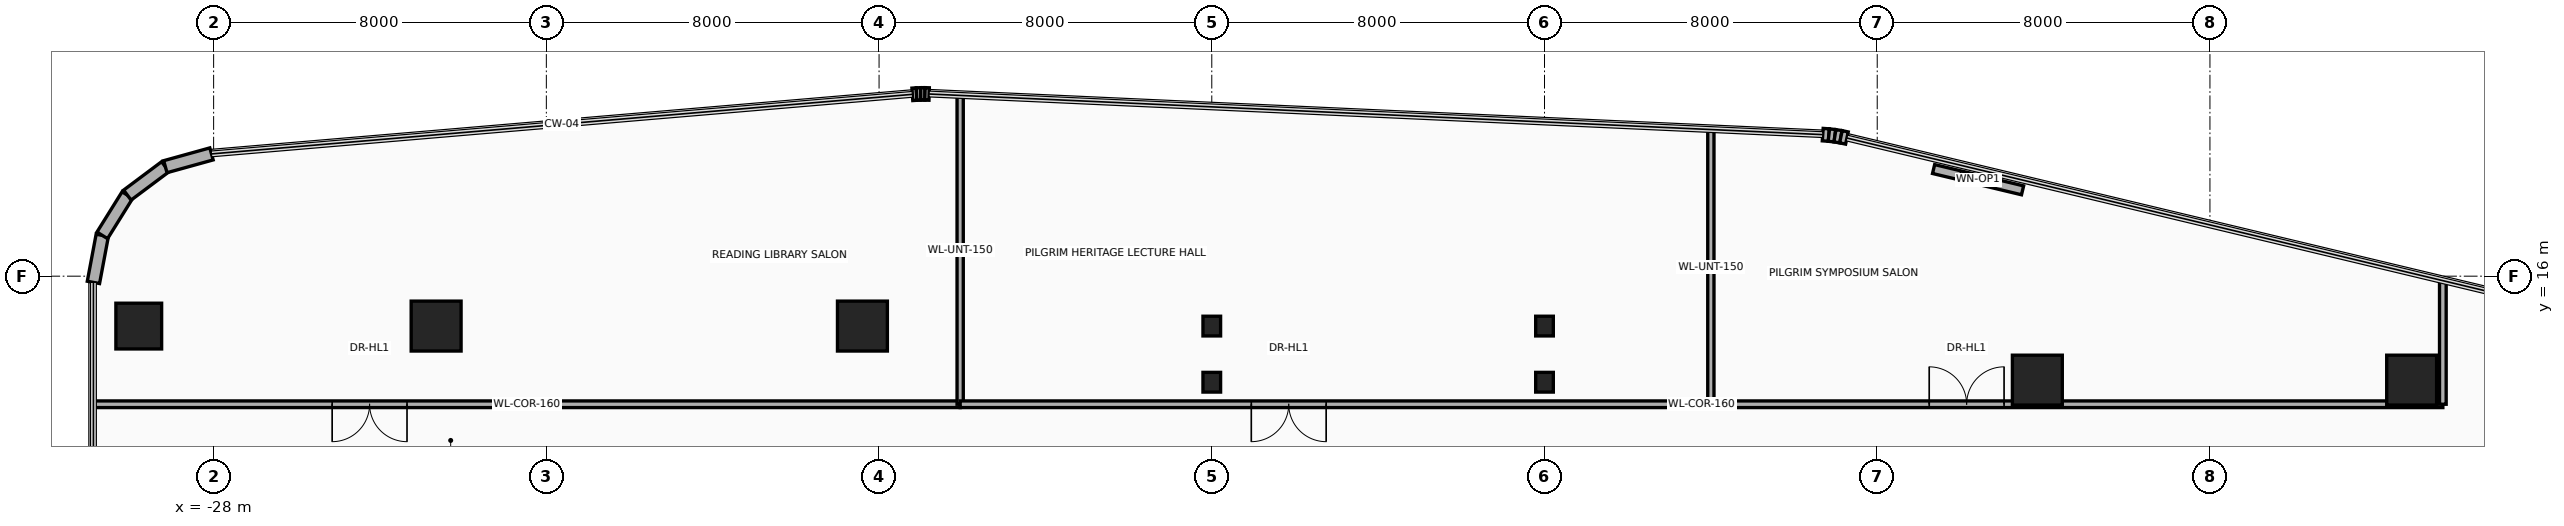
"""IFC4 building model, lengths in metres.
Left out: names, types, materials, properties, quantities, classifications, styles, units other than length and angle.
Written with IfcOpenShell. Run it as: python <this file> out.ifc"""

import sys

from ifc_helpers import new_model, si_unit, direction, frame, frame_2d, origin, origin_2d, place, context, subcontext, project, spatial, rectangle, circle, i_section, extrude, source, transform, mapped, element, fill, save


model = new_model("IFC4")
c1 = context("Model", 3, precision=1e-05, world=origin(), true_north=direction((0.0, 1.0)))
c2 = subcontext(c1, "Body", "Model", "MODEL_VIEW")
j1 = project(units=[si_unit("LENGTHUNIT", "METRE"), si_unit("PLANEANGLEUNIT", "RADIAN")], contexts=[c1])
p1 = place(None, origin())
s1 = spatial("IfcSite", under=j1, at=p1, CompositionType="ELEMENT")
p2 = place(p1, origin())
s2 = spatial("IfcBuilding", under=s1, at=p2, CompositionType="ELEMENT")
p3 = place(p2, frame((0.0, 0.0, 101.1)))
s3 = spatial("IfcBuildingStorey", under=s2, at=p3, CompositionType="ELEMENT", Elevation=101.1)
m1 = source(origin(), c2, "Body", "SweptSolid", [
    extrude(circle(Radius=0.55, at=origin_2d()), origin(), (0.0, 0.0, 1.0), 4.6),
])
p4 = place(p3, frame((-29.8, 14.8, 0.0), z_axis=(0.0, 0.0, 1.0), x_axis=(1.0, 0.0, 0.0)))
e1 = element("IfcColumn", 1, at=p4, inside=s3, PredefinedType="COLUMN", context=c2, shape_type="MappedRepresentation", body=[
    mapped(m1, transform((0.0, 0.0, 0.0), x_axis=(1.0, 0.0, 0.0), y_axis=(0.0, 1.0, 0.0), z_axis=(0.0, 0.0, 1.0), scale=1.0)),
])
m2 = source(origin(), c2, "Body", "SweptSolid", [
    extrude(rectangle(XDim=1.2, YDim=1.2, at=origin_2d()), origin(), (0.0, 0.0, 1.0), 4.6),
])
for number, where, z_axis, x_axis in (
    (2, (-22.65, 14.8, 0.0), (0.0, 0.0, 1.0), (1.0, 0.0, 0.0)),
    (3, (-12.4, 14.8, 0.0), (0.0, 0.0, 1.0), (1.0, 0.0, 0.0)),
    (4, (15.85, 13.5, 0.0), (0.0, 0.0, 1.0), (1.0, 0.0, 0.0)),
    (5, (24.85, 13.5, 0.0), (0.0, 0.0, 1.0), (1.0, 0.0, 0.0)),
):
    element("IfcColumn", number, at=place(p3, frame(where, z_axis=z_axis, x_axis=x_axis)), inside=s3, PredefinedType="COLUMN", context=c2, shape_type="MappedRepresentation", body=[
        mapped(m2, transform((0.0, 0.0, 0.0), x_axis=(1.0, 0.0, 0.0), y_axis=(0.0, 1.0, 0.0), z_axis=(0.0, 0.0, 1.0), scale=1.0)),
    ])
m3 = source(origin(), c2, "Body", "SweptSolid", [
    extrude(i_section(OverallWidth=0.424, OverallDepth=0.474, WebThickness=0.048, FlangeThickness=0.077, at=origin_2d()), origin(), (0.0, 0.0, 1.0), 4.6),
])
for number, where, z_axis, x_axis in (
    (6, (-4.0, 13.45, 0.0), (0.0, 0.0, 1.0), (1.0, 0.0, 0.0)),
    (7, (-4.0, 14.8, 0.0), (0.0, 0.0, 1.0), (1.0, 0.0, 0.0)),
    (8, (4.0, 13.45, 0.0), (0.0, 0.0, 1.0), (1.0, 0.0, 0.0)),
    (9, (4.0, 14.8, 0.0), (0.0, 0.0, 1.0), (1.0, 0.0, 0.0)),
):
    element("IfcColumn", number, at=place(p3, frame(where, z_axis=z_axis, x_axis=x_axis)), inside=s3, PredefinedType="COLUMN", context=c2, shape_type="MappedRepresentation", body=[
        mapped(m3, transform((0.0, 0.0, 0.0), x_axis=(1.0, 0.0, 0.0), y_axis=(0.0, 1.0, 0.0), z_axis=(0.0, 0.0, 1.0), scale=1.0)),
    ])
p5 = place(p3, frame((-30.89, 15.85, 0.0), z_axis=(0.0, 0.0, 1.0), x_axis=(0.184557499391, 0.982821718023, 0.0)))
e10 = element("IfcWall", 10, at=p5, inside=s3, PredefinedType="SOLIDWALL", context=c2, shape_type="SweptSolid", body=[
    extrude(rectangle(XDim=1.151, YDim=0.3, at=frame_2d((0.575, 0.0))), origin(), (0.0, 0.0, 1.0), 4.36),
])
p6 = place(p3, frame((-30.677, 16.981, 0.0), z_axis=(0.0, 0.0, 1.0), x_axis=(0.52880576008, 0.848742875143, 0.0)))
e11 = element("IfcWall", 11, at=p6, inside=s3, PredefinedType="SOLIDWALL", context=c2, shape_type="SweptSolid", body=[
    extrude(rectangle(XDim=1.141, YDim=0.3, at=frame_2d((0.57, 0.0))), origin(), (0.0, 0.0, 1.0), 4.36),
])
p7 = place(p3, frame((-30.074, 17.95, 0.0), z_axis=(0.0, 0.0, 1.0), x_axis=(0.800975009324, 0.598697782223, 0.0)))
e12 = element("IfcWall", 12, at=p7, inside=s3, PredefinedType="SOLIDWALL", context=c2, shape_type="SweptSolid", body=[
    extrude(rectangle(XDim=1.141, YDim=0.3, at=frame_2d((0.57, 0.0))), origin(), (0.0, 0.0, 1.0), 4.36),
])
p8 = place(p3, frame((-29.161, 18.633, 0.0), z_axis=(0.0, 0.0, 1.0), x_axis=(0.963624193367, 0.267260947313, 0.0)))
e13 = element("IfcWall", 13, at=p8, inside=s3, PredefinedType="SOLIDWALL", context=c2, shape_type="SweptSolid", body=[
    extrude(rectangle(XDim=1.151, YDim=0.3, at=frame_2d((0.575, 0.0))), origin(), (0.0, 0.0, 1.0), 4.36),
])
p9 = place(p3, frame((-11.199, 20.373, 0.0), z_axis=(0.0, 0.0, 1.0), x_axis=(0.997567332166, 0.069709524416, 0.0)))
e14 = element("IfcWall", 14, at=p9, inside=s3, PredefinedType="SOLIDWALL", context=c2, shape_type="SweptSolid", body=[
    extrude(rectangle(XDim=0.102, YDim=0.3, at=frame_2d((0.051, 0.0))), origin(), (0.0, 0.0, 1.0), 4.36),
])
p10 = place(p3, frame((-11.098, 20.38, 0.0), z_axis=(0.0, 0.0, 1.0), x_axis=(0.999334672785, 0.03647206835, 0.0)))
e15 = element("IfcWall", 15, at=p10, inside=s3, PredefinedType="SOLIDWALL", context=c2, shape_type="SweptSolid", body=[
    extrude(rectangle(XDim=0.1, YDim=0.3, at=frame_2d((0.05, 0.0))), origin(), (0.0, 0.0, 1.0), 4.36),
])
p11 = place(p3, frame((-10.998, 20.383, 0.0), z_axis=(0.0, 0.0, 1.0), x_axis=(0.999997054401, 0.002427177317, 0.0)))
e16 = element("IfcWall", 16, at=p11, inside=s3, PredefinedType="SOLIDWALL", context=c2, shape_type="SweptSolid", body=[
    extrude(rectangle(XDim=0.101, YDim=0.3, at=frame_2d((0.05, 0.0))), origin(), (0.0, 0.0, 1.0), 4.36),
])
p12 = place(p3, frame((-10.897, 20.384, 0.0), z_axis=(0.0, 0.0, 1.0), x_axis=(0.999584209171, -0.02883415988, 0.0)))
e17 = element("IfcWall", 17, at=p12, inside=s3, PredefinedType="SOLIDWALL", context=c2, shape_type="SweptSolid", body=[
    extrude(rectangle(XDim=0.102, YDim=0.3, at=frame_2d((0.051, 0.0))), origin(), (0.0, 0.0, 1.0), 4.36),
])
p13 = place(p3, frame((10.69, 19.404, 0.0), z_axis=(0.0, 0.0, 1.0), x_axis=(0.99758310784, -0.069483400546, 0.0)))
e18 = element("IfcWall", 18, at=p13, inside=s3, PredefinedType="SOLIDWALL", context=c2, shape_type="SweptSolid", body=[
    extrude(rectangle(XDim=0.147, YDim=0.3, at=frame_2d((0.074, 0.0))), origin(), (0.0, 0.0, 1.0), 4.36),
])
for number, where, z_axis, x_axis in (
    (19, (10.837, 19.394, 0.0), (0.0, 0.0, 1.0), (0.993, -0.117, 0.0)),
    (20, (10.983, 19.377, 0.0), (0.0, 0.0, 1.0), (0.987, -0.163, 0.0)),
):
    element("IfcWall", number, at=place(p3, frame(where, z_axis=z_axis, x_axis=x_axis)), inside=s3, PredefinedType="SOLIDWALL", context=c2, shape_type="SweptSolid", body=[
        extrude(rectangle(XDim=0.146, YDim=0.3, at=frame_2d((0.073, 0.0))), origin(), (0.0, 0.0, 1.0), 4.36),
    ])
p14 = place(p3, frame((11.127, 19.353, 0.0), z_axis=(0.0, 0.0, 1.0), x_axis=(0.978019841688, -0.208511844421, 0.0)))
e21 = element("IfcWall", 21, at=p14, inside=s3, PredefinedType="SOLIDWALL", context=c2, shape_type="SweptSolid", body=[
    extrude(rectangle(XDim=0.147, YDim=0.3, at=frame_2d((0.074, 0.0))), origin(), (0.0, 0.0, 1.0), 4.36),
])
p15 = place(p3, frame((13.355, 18.576, 0.0), z_axis=(0.0, 0.0, 1.0), x_axis=(0.97252211384, -0.232810519721, 0.0)))
e22 = element("IfcWall", 22, at=p15, inside=s3, PredefinedType="SOLIDWALL", context=c2, shape_type="SweptSolid", body=[
    extrude(rectangle(XDim=2.2, YDim=0.22, at=frame_2d((1.1, 0.0))), origin(), (0.0, 0.0, 1.0), 4.36),
])
p16 = place(p15, frame((0.65, 0.0, 0.95)))
e23 = element("IfcOpeningElement", 23, at=p16, cuts=e22, PredefinedType="OPENING", context=c2, shape_type="SweptSolid", body=[
    extrude(rectangle(XDim=0.9, YDim=1.3, at=frame_2d((0.45, 0.65))), frame((0.0, 0.125, 0.0), z_axis=(0.0, -1.0, 0.0), x_axis=(1.0, 0.0, 0.0)), (0.0, 0.0, 1.0), 0.25),
])
p17 = place(p3, frame((-30.89, 12.92, 0.0), z_axis=(0.0, 0.0, 1.0), x_axis=(1.0, 0.0, 0.0)))
e24 = element("IfcWall", 24, at=p17, inside=s3, PredefinedType="PARTITIONING", context=c2, shape_type="SweptSolid", body=[
    extrude(rectangle(XDim=20.84, YDim=0.16, at=frame_2d((10.42, 0.0))), origin(), (0.0, 0.0, 1.0), 3.734),
])
p18 = place(p17, frame((5.74, 0.0, 0.0)))
e25 = element("IfcOpeningElement", 25, at=p18, cuts=e24, PredefinedType="OPENING", context=c2, shape_type="SweptSolid", body=[
    extrude(rectangle(XDim=1.8, YDim=2.15, at=frame_2d((0.9, 1.075))), frame((0.0, 0.095, 0.0), z_axis=(0.0, -1.0, 0.0), x_axis=(1.0, 0.0, 0.0)), (0.0, 0.0, 1.0), 0.19),
])
p19 = place(p3, frame((-10.05, 12.92, 0.0), z_axis=(0.0, 0.0, 1.0), x_axis=(0.0, 1.0, 0.0)))
e26 = element("IfcWall", 26, at=p19, inside=s3, PredefinedType="PARTITIONING", context=c2, shape_type="SweptSolid", body=[
    extrude(rectangle(XDim=7.427, YDim=0.15, at=frame_2d((3.713, 0.0))), origin(), (0.0, 0.0, 1.0), 3.566),
])
p20 = place(p3, frame((-10.05, 12.92, 0.0), z_axis=(0.0, 0.0, 1.0), x_axis=(1.0, 0.0, 0.0)))
e27 = element("IfcWall", 27, at=p20, inside=s3, PredefinedType="PARTITIONING", context=c2, shape_type="SweptSolid", body=[
    extrude(rectangle(XDim=35.65, YDim=0.16, at=frame_2d((17.825, 0.0))), origin(), (0.0, 0.0, 1.0), 3.566),
])
p21 = place(p20, frame((7.0, 0.0, 0.0)))
e28 = element("IfcOpeningElement", 28, at=p21, cuts=e27, PredefinedType="OPENING", context=c2, shape_type="SweptSolid", body=[
    extrude(rectangle(XDim=1.8, YDim=2.15, at=frame_2d((0.9, 1.075))), frame((0.0, 0.095, 0.0), z_axis=(0.0, -1.0, 0.0), x_axis=(1.0, 0.0, 0.0)), (0.0, 0.0, 1.0), 0.19),
])
p22 = place(p20, frame((23.3, 0.0, 0.0)))
e29 = element("IfcOpeningElement", 29, at=p22, cuts=e27, PredefinedType="OPENING", context=c2, shape_type="SweptSolid", body=[
    extrude(rectangle(XDim=1.8, YDim=2.15, at=frame_2d((0.9, 1.075))), frame((0.0, 0.095, 0.0), z_axis=(0.0, -1.0, 0.0), x_axis=(1.0, 0.0, 0.0)), (0.0, 0.0, 1.0), 0.19),
])
p23 = place(p3, frame((8.0, 12.92, 0.0), z_axis=(0.0, 0.0, 1.0), x_axis=(0.0, 1.0, 0.0)))
e30 = element("IfcWall", 30, at=p23, inside=s3, PredefinedType="PARTITIONING", context=c2, shape_type="SweptSolid", body=[
    extrude(rectangle(XDim=6.606, YDim=0.15, at=frame_2d((3.303, 0.0))), origin(), (0.0, 0.0, 1.0), 3.566),
])
p24 = place(p3, frame((25.6, 12.92, 0.0), z_axis=(0.0, 0.0, 1.0), x_axis=(0.0, 1.0, 0.0)))
e31 = element("IfcWall", 31, at=p24, inside=s3, PredefinedType="PARTITIONING", context=c2, shape_type="SweptSolid", body=[
    extrude(rectangle(XDim=2.972, YDim=0.16, at=frame_2d((1.486, 0.0))), origin(), (0.0, 0.0, 1.0), 3.566),
])
p25 = place(p16, origin())
e32 = element("IfcWindow", 32, at=p25, inside=s3, PartitioningType="SINGLE_PANEL", PredefinedType="WINDOW", context=c2, shape_type="SweptSolid", body=[
    extrude(rectangle(XDim=0.9, YDim=1.3, at=frame_2d((0.45, 0.65))), frame((0.0, 0.03, 0.0), z_axis=(0.0, -1.0, 0.0), x_axis=(1.0, 0.0, 0.0)), (0.0, 0.0, 1.0), 0.06),
])
fill(e23, e32)
p26 = place(p18, frame((1.8, 0.0, 0.0), z_axis=(0.0, 0.0, 1.0), x_axis=(-1.0, 0.0, 0.0)))
e33 = element("IfcDoor", 33, at=p26, inside=s3, OperationType="DOUBLE_DOOR_SINGLE_SWING", PredefinedType="DOOR", context=c2, shape_type="SweptSolid", body=[
    extrude(rectangle(XDim=1.8, YDim=2.15, at=frame_2d((0.9, 1.075))), frame((0.0, 0.025, 0.0), z_axis=(0.0, -1.0, 0.0), x_axis=(1.0, 0.0, 0.0)), (0.0, 0.0, 1.0), 0.05),
])
fill(e25, e33)
p27 = place(p21, frame((1.8, 0.0, 0.0), z_axis=(0.0, 0.0, 1.0), x_axis=(-1.0, 0.0, 0.0)))
e34 = element("IfcDoor", 34, at=p27, inside=s3, OperationType="DOUBLE_DOOR_SINGLE_SWING", PredefinedType="DOOR", context=c2, shape_type="SweptSolid", body=[
    extrude(rectangle(XDim=1.8, YDim=2.15, at=frame_2d((0.9, 1.075))), frame((0.0, 0.025, 0.0), z_axis=(0.0, -1.0, 0.0), x_axis=(1.0, 0.0, 0.0)), (0.0, 0.0, 1.0), 0.05),
])
fill(e28, e34)
p28 = place(p22, origin())
e35 = element("IfcDoor", 35, at=p28, inside=s3, OperationType="DOUBLE_DOOR_SINGLE_SWING", PredefinedType="DOOR", context=c2, shape_type="SweptSolid", body=[
    extrude(rectangle(XDim=1.8, YDim=2.15, at=frame_2d((0.9, 1.075))), frame((0.0, 0.025, 0.0), z_axis=(0.0, -1.0, 0.0), x_axis=(1.0, 0.0, 0.0)), (0.0, 0.0, 1.0), 0.05),
])
fill(e29, e35)
save(model, sys.argv[1])
